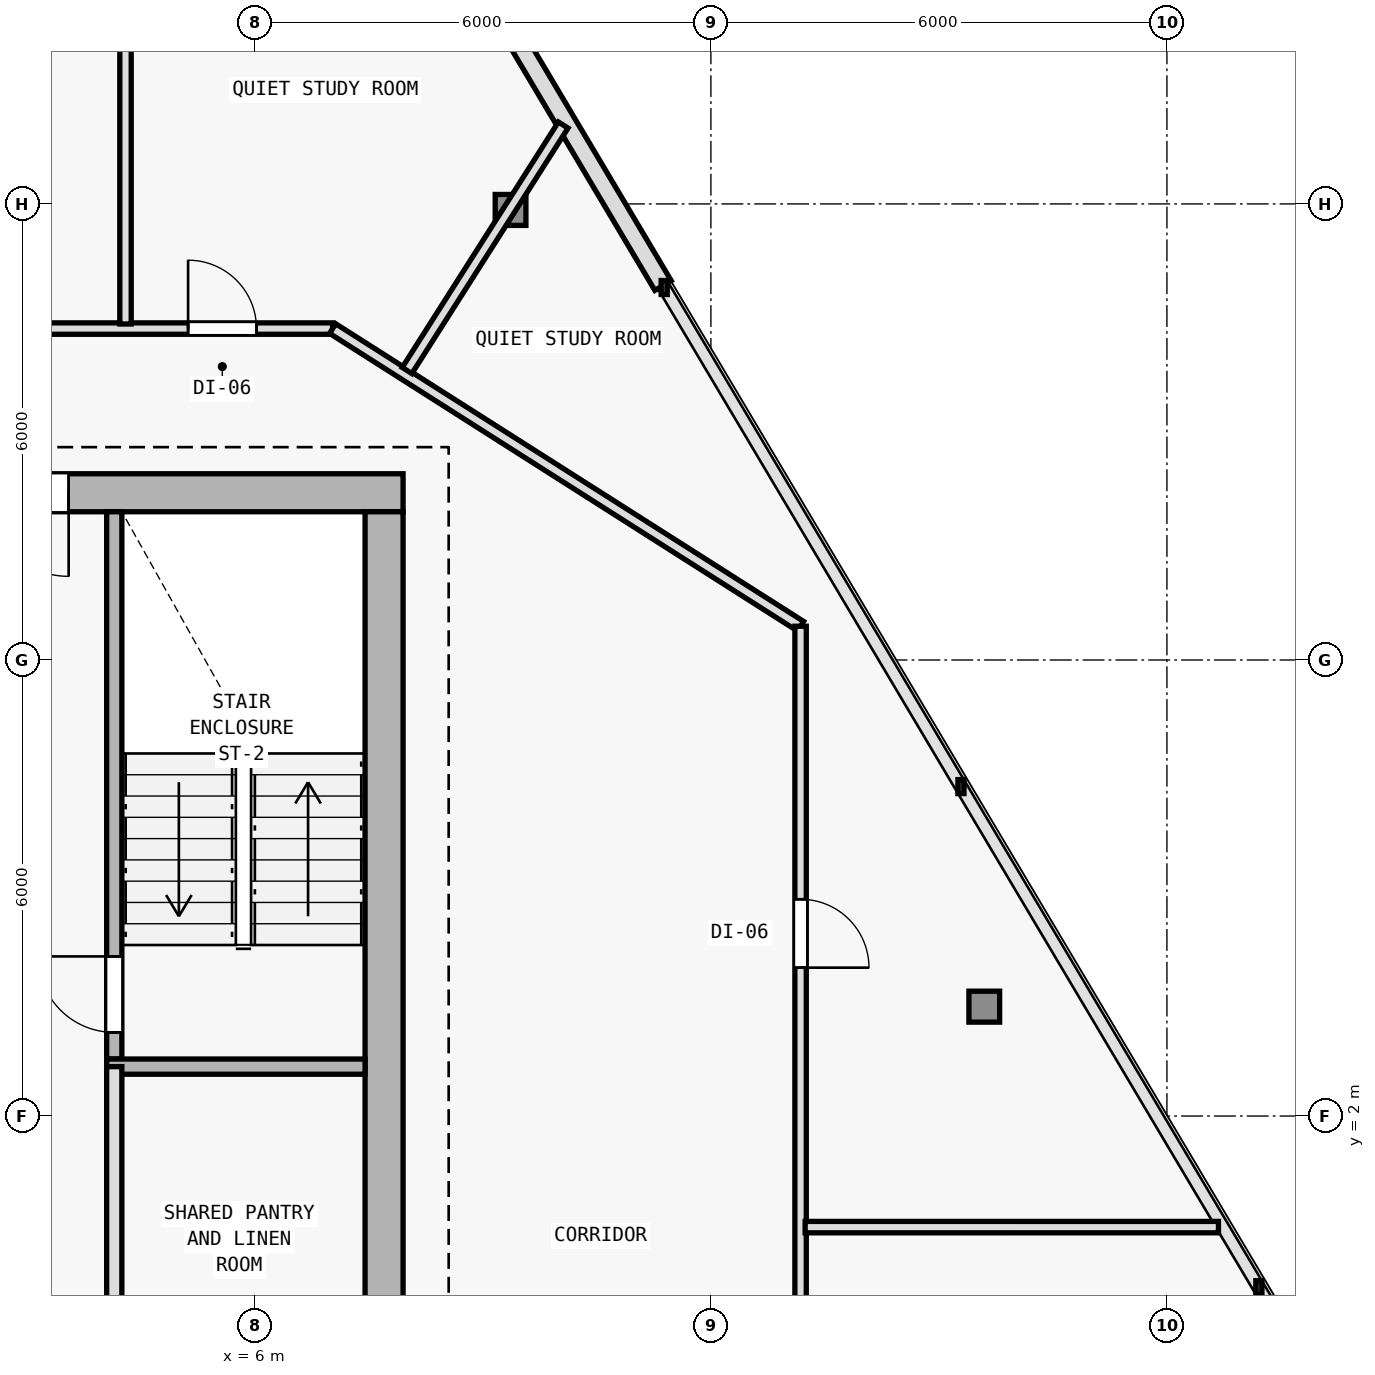
"""IFC4 building model, lengths in metres.
Left out: names, types, materials, properties, quantities, classifications, styles, units other than length and angle.
Written with IfcOpenShell. Run it as: python <this file> out.ifc"""

import sys

from ifc_helpers import new_model, si_unit, direction, frame, frame_2d, origin, origin_2d, place, context, subcontext, project, spatial, rectangle, i_section, extrude, element, fill, save


model = new_model("IFC4")
c1 = context("Model", 3, precision=1e-05, world=origin(), true_north=direction((0.0, 1.0)))
c2 = subcontext(c1, "Body", "Model", "MODEL_VIEW")
j1 = project(units=[si_unit("LENGTHUNIT", "METRE"), si_unit("PLANEANGLEUNIT", "RADIAN")], contexts=[c1])
p1 = place(None, origin())
s1 = spatial("IfcSite", under=j1, at=p1, CompositionType="ELEMENT")
p2 = place(p1, origin())
s2 = spatial("IfcBuilding", under=s1, at=p2, CompositionType="ELEMENT")
p3 = place(p2, frame((0.0, 0.0, 160.2)))
s3 = spatial("IfcBuildingStorey", under=s2, at=p3, CompositionType="ELEMENT", Elevation=160.2)
for number, where, z_axis, x_axis in (
    (1, (7.7, 10.2, 0.0), (0.0, 0.0, 1.0), (1.0, 0.0, 0.0)),
    (2, (7.7, 0.4, 0.0), (0.0, 0.0, 1.0), (1.0, 0.0, 0.0)),
):
    element("IfcColumn", number, at=place(p3, frame(where, z_axis=z_axis, x_axis=x_axis)), inside=s3, PredefinedType="COLUMN", context=c2, shape_type="SweptSolid", body=[
        extrude(i_section(OverallWidth=0.404, OverallDepth=0.407, WebThickness=0.017, FlangeThickness=0.028, FilletRadius=0.015, at=origin_2d()), origin(), (0.0, 0.0, 1.0), 3.6),
    ])
p4 = place(p3, frame((15.597, 3.439, 0.006), z_axis=(-0.018907314261, 0.009589680974, 0.999775250487), x_axis=(-0.452339157861, -0.891845999187, 0.0)))
e3 = element("IfcColumn", 3, at=p4, inside=s3, PredefinedType="COLUMN", context=c2, shape_type="SweptSolid", body=[
    extrude(i_section(OverallWidth=0.404, OverallDepth=0.407, WebThickness=0.017, FlangeThickness=0.028, FilletRadius=0.015, at=origin_2d()), origin(), (0.0, 0.0, 1.0), 3.59),
])
p5 = place(p3, frame((9.364, 13.921, 0.006), z_axis=(-0.011767853257, -0.00258484638, 0.999927415465), x_axis=(0.214538664031, -0.976715496773, 0.0)))
e4 = element("IfcColumn", 4, at=p5, inside=s3, PredefinedType="COLUMN", context=c2, shape_type="SweptSolid", body=[
    extrude(i_section(OverallWidth=0.404, OverallDepth=0.407, WebThickness=0.017, FlangeThickness=0.028, FilletRadius=0.015, at=origin_2d()), origin(), (0.0, 0.0, 1.0), 3.589),
])
p6 = place(p3, frame((5.862, 22.19, 0.0), z_axis=(0.0, 0.0, 1.0), x_axis=(0.511083986456, -0.859530778267, 0.0)))
e5 = element("IfcWall", 5, at=p6, inside=s3, PredefinedType="SOLIDWALL", context=c2, shape_type="SweptSolid", body=[
    extrude(rectangle(XDim=10.778, YDim=0.25, at=frame_2d((5.389, 0.0))), origin(), (0.0, 0.0, 1.0), 3.35),
])
p7 = place(p6, frame((4.639, 0.0, 0.62)))
e6 = element("IfcOpeningElement", 6, at=p7, cuts=e5, PredefinedType="OPENING", context=c2, shape_type="SweptSolid", body=[
    extrude(rectangle(XDim=1.5, YDim=2.0, at=frame_2d((0.75, 1.0))), frame((0.0, 0.135, 0.0), z_axis=(0.0, -1.0, 0.0), x_axis=(1.0, 0.0, 0.0)), (0.0, 0.0, 1.0), 0.27),
])
p8 = place(p3, frame((7.95, 10.2, 0.0), z_axis=(0.0, 0.0, 1.0), x_axis=(-1.0, 0.0, 0.0)))
e7 = element("IfcWall", 7, at=p8, inside=s3, PredefinedType="SHEAR", context=c2, shape_type="SweptSolid", body=[
    extrude(rectangle(XDim=15.9, YDim=0.5, at=frame_2d((7.95, 0.0))), origin(), (0.0, 0.0, 1.0), 3.35),
])
p9 = place(p8, frame((4.4, 0.0, 0.0)))
e8 = element("IfcOpeningElement", 8, at=p9, cuts=e7, PredefinedType="OPENING", context=c2, shape_type="SweptSolid", body=[
    extrude(rectangle(XDim=1.1, YDim=2.15, at=frame_2d((0.55, 1.075))), frame((0.0, 0.26, 0.0), z_axis=(0.0, -1.0, 0.0), x_axis=(1.0, 0.0, 0.0)), (0.0, 0.0, 1.0), 0.52),
])
p10 = place(p3, frame((7.7, 9.95, 0.0), z_axis=(0.0, 0.0, 1.0), x_axis=(0.0, -1.0, 0.0)))
e9 = element("IfcWall", 9, at=p10, inside=s3, PredefinedType="SHEAR", context=c2, shape_type="SweptSolid", body=[
    extrude(rectangle(XDim=19.1, YDim=0.5, at=frame_2d((9.55, 0.0))), origin(), (0.0, 0.0, 1.0), 3.35),
])
p11 = place(p3, frame((4.15, 2.75, 0.0), z_axis=(0.0, 0.0, 1.0), x_axis=(0.0, 1.0, 0.0)))
e10 = element("IfcWall", 10, at=p11, inside=s3, PredefinedType="SOLIDWALL", context=c2, shape_type="SweptSolid", body=[
    extrude(rectangle(XDim=7.2, YDim=0.2, at=frame_2d((3.6, 0.0))), origin(), (0.0, 0.0, 1.0), 3.35),
])
p12 = place(p11, frame((0.35, 0.0, 0.0)))
e11 = element("IfcOpeningElement", 11, at=p12, cuts=e10, PredefinedType="OPENING", context=c2, shape_type="SweptSolid", body=[
    extrude(rectangle(XDim=1.0, YDim=2.15, at=frame_2d((0.5, 1.075))), frame((0.0, 0.11, 0.0), z_axis=(0.0, -1.0, 0.0), x_axis=(1.0, 0.0, 0.0)), (0.0, 0.0, 1.0), 0.22),
])
p13 = place(p3, frame((4.05, 2.65, 0.0), z_axis=(0.0, 0.0, 1.0), x_axis=(1.0, 0.0, 0.0)))
e12 = element("IfcWall", 12, at=p13, inside=s3, PredefinedType="SOLIDWALL", context=c2, shape_type="SweptSolid", body=[
    extrude(rectangle(XDim=3.4, YDim=0.2, at=frame_2d((1.7, 0.0))), origin(), (0.0, 0.0, 1.0), 3.35),
])
p14 = place(p3, frame((4.15, -6.05, 0.0), z_axis=(0.0, 0.0, 1.0), x_axis=(0.0, 1.0, 0.0)))
e13 = element("IfcWall", 13, at=p14, inside=s3, PredefinedType="SOLIDWALL", context=c2, shape_type="SweptSolid", body=[
    extrude(rectangle(XDim=8.7, YDim=0.2, at=frame_2d((4.35, 0.0))), origin(), (0.0, 0.0, 1.0), 3.35),
])
p15 = place(p14, frame((3.6, 0.0, 0.0)))
e14 = element("IfcOpeningElement", 14, at=p15, cuts=e13, PredefinedType="OPENING", context=c2, shape_type="SweptSolid", body=[
    extrude(rectangle(XDim=0.95, YDim=2.1, at=frame_2d((0.475, 1.05))), frame((0.0, 0.11, 0.0), z_axis=(0.0, -1.0, 0.0), x_axis=(1.0, 0.0, 0.0)), (0.0, 0.0, 1.0), 0.22),
])
p16 = place(p3, frame((-7.041, 12.36, 0.0), z_axis=(0.0, 0.0, 1.0), x_axis=(1.0, 0.0, 0.0)))
e15 = element("IfcWall", 15, at=p16, inside=s3, PredefinedType="PARTITIONING", context=c2, shape_type="SweptSolid", body=[
    extrude(rectangle(XDim=14.064, YDim=0.15, at=frame_2d((7.032, 0.0))), origin(), (0.0, 0.0, 1.0), 2.965),
])
p17 = place(p16, frame((12.163, 0.0, 0.0)))
e16 = element("IfcOpeningElement", 16, at=p17, cuts=e15, PredefinedType="OPENING", context=c2, shape_type="SweptSolid", body=[
    extrude(rectangle(XDim=0.9, YDim=2.1, at=frame_2d((0.45, 1.05))), frame((0.0, 0.085, 0.0), z_axis=(0.0, -1.0, 0.0), x_axis=(1.0, 0.0, 0.0)), (0.0, 0.0, 1.0), 0.17),
])
p18 = place(p16, frame((9.217, 0.0, 0.0)))
e17 = element("IfcOpeningElement", 17, at=p18, cuts=e15, PredefinedType="OPENING", context=c2, shape_type="SweptSolid", body=[
    extrude(rectangle(XDim=0.9, YDim=2.1, at=frame_2d((0.45, 1.05))), frame((0.0, 0.085, 0.0), z_axis=(0.0, -1.0, 0.0), x_axis=(1.0, 0.0, 0.0)), (0.0, 0.0, 1.0), 0.17),
])
p19 = place(p16, frame((6.209, 0.0, 0.0)))
e18 = element("IfcOpeningElement", 18, at=p19, cuts=e15, PredefinedType="OPENING", context=c2, shape_type="SweptSolid", body=[
    extrude(rectangle(XDim=0.9, YDim=2.1, at=frame_2d((0.45, 1.05))), frame((0.0, 0.085, 0.0), z_axis=(0.0, -1.0, 0.0), x_axis=(1.0, 0.0, 0.0)), (0.0, 0.0, 1.0), 0.17),
])
p20 = place(p16, frame((2.315, 0.0, 0.0)))
e19 = element("IfcOpeningElement", 19, at=p20, cuts=e15, PredefinedType="OPENING", context=c2, shape_type="SweptSolid", body=[
    extrude(rectangle(XDim=0.9, YDim=2.1, at=frame_2d((0.45, 1.05))), frame((0.0, 0.085, 0.0), z_axis=(0.0, -1.0, 0.0), x_axis=(1.0, 0.0, 0.0)), (0.0, 0.0, 1.0), 0.17),
])
p21 = place(p3, frame((7.023, 12.36, 0.0), z_axis=(0.0, 0.0, 1.0), x_axis=(0.84376480085, -0.536713108511, 0.0)))
e20 = element("IfcWall", 20, at=p21, inside=s3, PredefinedType="PARTITIONING", context=c2, shape_type="SweptSolid", body=[
    extrude(rectangle(XDim=7.297, YDim=0.15, at=frame_2d((3.648, 0.0))), origin(), (0.0, 0.0, 1.0), 2.925),
])
p22 = place(p3, frame((13.18, 8.444, 0.0), z_axis=(0.0, 0.0, 1.0), x_axis=(0.0, -1.0, 0.0)))
e21 = element("IfcWall", 21, at=p22, inside=s3, PredefinedType="PARTITIONING", context=c2, shape_type="SweptSolid", body=[
    extrude(rectangle(XDim=20.004, YDim=0.15, at=frame_2d((10.002, 0.0))), origin(), (0.0, 0.0, 1.0), 2.825),
])
p23 = place(p22, frame((17.187, 0.0, 0.0)))
e22 = element("IfcOpeningElement", 22, at=p23, cuts=e21, PredefinedType="OPENING", context=c2, shape_type="SweptSolid", body=[
    extrude(rectangle(XDim=0.9, YDim=2.1, at=frame_2d((0.45, 1.05))), frame((0.0, 0.085, 0.0), z_axis=(0.0, -1.0, 0.0), x_axis=(1.0, 0.0, 0.0)), (0.0, 0.0, 1.0), 0.17),
])
p24 = place(p22, frame((11.227, 0.0, 0.0)))
e23 = element("IfcOpeningElement", 23, at=p24, cuts=e21, PredefinedType="OPENING", context=c2, shape_type="SweptSolid", body=[
    extrude(rectangle(XDim=0.9, YDim=2.1, at=frame_2d((0.45, 1.05))), frame((0.0, 0.085, 0.0), z_axis=(0.0, -1.0, 0.0), x_axis=(1.0, 0.0, 0.0)), (0.0, 0.0, 1.0), 0.17),
])
p25 = place(p22, frame((3.592, 0.0, 0.0)))
e24 = element("IfcOpeningElement", 24, at=p25, cuts=e21, PredefinedType="OPENING", context=c2, shape_type="SweptSolid", body=[
    extrude(rectangle(XDim=0.9, YDim=2.1, at=frame_2d((0.45, 1.05))), frame((0.0, 0.085, 0.0), z_axis=(0.0, -1.0, 0.0), x_axis=(1.0, 0.0, 0.0)), (0.0, 0.0, 1.0), 0.17),
])
p26 = place(p3, frame((8.002, 11.808, 0.0), z_axis=(0.0, 0.0, 1.0), x_axis=(0.536702130852, 0.843771783564, 0.0)))
e25 = element("IfcWall", 25, at=p26, inside=s3, PredefinedType="PARTITIONING", context=c2, shape_type="SweptSolid", body=[
    extrude(rectangle(XDim=3.827, YDim=0.15, at=frame_2d((1.914, 0.0))), origin(), (0.0, 0.0, 1.0), 2.935),
])
p27 = place(p3, frame((13.24, 0.539, 0.0), z_axis=(0.0, 0.0, 1.0), x_axis=(1.0, 0.0, 0.0)))
e26 = element("IfcWall", 26, at=p27, inside=s3, PredefinedType="PARTITIONING", context=c2, shape_type="SweptSolid", body=[
    extrude(rectangle(XDim=5.438, YDim=0.15, at=frame_2d((2.719, 0.0))), origin(), (0.0, 0.0, 1.0), 2.875),
])
p28 = place(p3, frame((4.298, 12.42, 0.0), z_axis=(0.0, 0.0, 1.0), x_axis=(0.0, 1.0, 0.0)))
e27 = element("IfcWall", 27, at=p28, inside=s3, PredefinedType="PARTITIONING", context=c2, shape_type="SweptSolid", body=[
    extrude(rectangle(XDim=8.918, YDim=0.15, at=frame_2d((4.459, 0.0))), origin(), (0.0, 0.0, 1.0), 2.935),
])
p29 = place(p9, origin())
e28 = element("IfcDoor", 28, at=p29, inside=s3, OperationType="SINGLE_SWING_LEFT", PredefinedType="DOOR", context=c2, shape_type="SweptSolid", body=[
    extrude(rectangle(XDim=1.1, YDim=2.15, at=frame_2d((0.55, 1.075))), frame((0.0, 0.025, 0.0), z_axis=(0.0, -1.0, 0.0), x_axis=(1.0, 0.0, 0.0)), (0.0, 0.0, 1.0), 0.05),
])
fill(e8, e28)
p30 = place(p12, origin())
e29 = element("IfcDoor", 29, at=p30, inside=s3, OperationType="SINGLE_SWING_RIGHT", PredefinedType="DOOR", context=c2, shape_type="SweptSolid", body=[
    extrude(rectangle(XDim=1.0, YDim=2.15, at=frame_2d((0.5, 1.075))), frame((0.0, 0.025, 0.0), z_axis=(0.0, -1.0, 0.0), x_axis=(1.0, 0.0, 0.0)), (0.0, 0.0, 1.0), 0.05),
])
fill(e11, e29)
p31 = place(p25, origin())
e30 = element("IfcDoor", 30, at=p31, inside=s3, OperationType="SINGLE_SWING_RIGHT", PredefinedType="DOOR", context=c2, shape_type="SweptSolid", body=[
    extrude(rectangle(XDim=0.9, YDim=2.1, at=frame_2d((0.45, 1.05))), frame((0.0, 0.025, 0.0), z_axis=(0.0, -1.0, 0.0), x_axis=(1.0, 0.0, 0.0)), (0.0, 0.0, 1.0), 0.05),
])
fill(e24, e30)
p32 = place(p17, origin())
e31 = element("IfcDoor", 31, at=p32, inside=s3, OperationType="SINGLE_SWING_LEFT", PredefinedType="DOOR", context=c2, shape_type="SweptSolid", body=[
    extrude(rectangle(XDim=0.9, YDim=2.1, at=frame_2d((0.45, 1.05))), frame((0.0, 0.025, 0.0), z_axis=(0.0, -1.0, 0.0), x_axis=(1.0, 0.0, 0.0)), (0.0, 0.0, 1.0), 0.05),
])
fill(e16, e31)
save(model, sys.argv[1])
